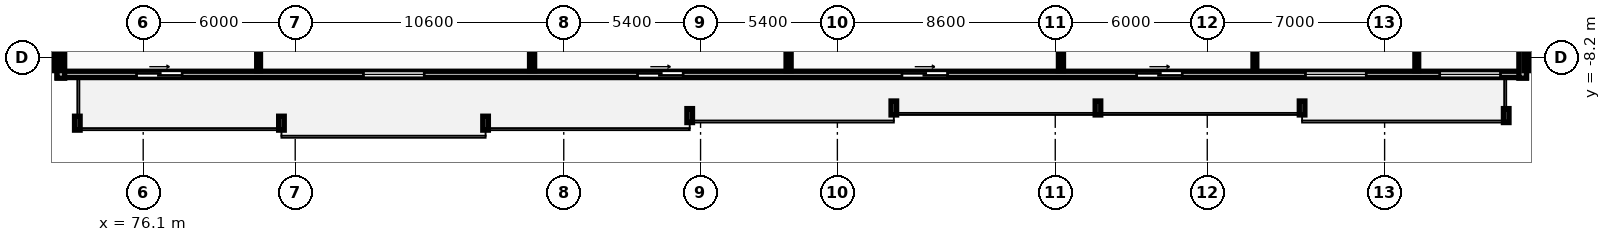
"""IFC4 building model, lengths in metres.
Left out: names, types, materials, properties, quantities, classifications, styles, units other than length and angle.
Written with IfcOpenShell. Run it as: python <this file> out.ifc"""

import sys

from ifc_helpers import new_model, si_unit, direction, frame, frame_2d, origin, place, context, subcontext, project, spatial, rectangle, extrude, element, fill, save


model = new_model("IFC4")
c1 = context("Model", 3, precision=1e-05, world=origin(), true_north=direction((0.0, 1.0)))
c2 = subcontext(c1, "Body", "Model", "MODEL_VIEW")
j1 = project(units=[si_unit("LENGTHUNIT", "METRE"), si_unit("PLANEANGLEUNIT", "RADIAN")], contexts=[c1])
p1 = place(None, origin())
s1 = spatial("IfcSite", under=j1, at=p1, CompositionType="ELEMENT")
p2 = place(p1, origin())
s2 = spatial("IfcBuilding", under=s1, at=p2, CompositionType="ELEMENT")
p3 = place(p2, frame((0.0, 0.0, 100.3)))
s3 = spatial("IfcBuildingStorey", under=s2, at=p3, CompositionType="ELEMENT", Elevation=100.3)
p4 = place(p3, frame((72.7, -8.85, 0.0), z_axis=(0.0, 0.0, 1.0), x_axis=(1.0, 0.0, 0.0)))
e1 = element("IfcWall", 1, at=p4, inside=s3, PredefinedType="STANDARD", context=c2, shape_type="SweptSolid", body=[
    extrude(rectangle(XDim=58.0, YDim=0.25, at=frame_2d((29.0, 0.0))), origin(), (0.0, 0.0, 1.0), 2.97),
])
p5 = place(p4, frame((3.137, 0.0, 0.0)))
e2 = element("IfcOpeningElement", 2, at=p5, cuts=e1, PredefinedType="OPENING", context=c2, shape_type="SweptSolid", body=[
    extrude(rectangle(XDim=1.8, YDim=2.2, at=frame_2d((0.9, 1.1))), frame((0.0, 0.135, 0.0), z_axis=(0.0, -1.0, 0.0), x_axis=(1.0, 0.0, 0.0)), (0.0, 0.0, 1.0), 0.27),
])
p6 = place(p4, frame((12.093, 0.0, 0.85)))
e3 = element("IfcOpeningElement", 3, at=p6, cuts=e1, PredefinedType="OPENING", context=c2, shape_type="SweptSolid", body=[
    extrude(rectangle(XDim=2.4, YDim=1.9, at=frame_2d((1.2, 0.95))), frame((0.0, 0.135, 0.0), z_axis=(0.0, -1.0, 0.0), x_axis=(1.0, 0.0, 0.0)), (0.0, 0.0, 1.0), 0.27),
])
p7 = place(p4, frame((22.913, 0.0, 0.0)))
e4 = element("IfcOpeningElement", 4, at=p7, cuts=e1, PredefinedType="OPENING", context=c2, shape_type="SweptSolid", body=[
    extrude(rectangle(XDim=1.8, YDim=2.2, at=frame_2d((0.9, 1.1))), frame((0.0, 0.135, 0.0), z_axis=(0.0, -1.0, 0.0), x_axis=(1.0, 0.0, 0.0)), (0.0, 0.0, 1.0), 0.27),
])
p8 = place(p4, frame((33.35, 0.0, 0.0)))
e5 = element("IfcOpeningElement", 5, at=p8, cuts=e1, PredefinedType="OPENING", context=c2, shape_type="SweptSolid", body=[
    extrude(rectangle(XDim=1.8, YDim=2.2, at=frame_2d((0.9, 1.1))), frame((0.0, 0.135, 0.0), z_axis=(0.0, -1.0, 0.0), x_axis=(1.0, 0.0, 0.0)), (0.0, 0.0, 1.0), 0.27),
])
p9 = place(p4, frame((49.275, 0.0, 0.85)))
e6 = element("IfcOpeningElement", 6, at=p9, cuts=e1, PredefinedType="OPENING", context=c2, shape_type="SweptSolid", body=[
    extrude(rectangle(XDim=2.4, YDim=1.9, at=frame_2d((1.2, 0.95))), frame((0.0, 0.135, 0.0), z_axis=(0.0, -1.0, 0.0), x_axis=(1.0, 0.0, 0.0)), (0.0, 0.0, 1.0), 0.27),
])
p10 = place(p4, frame((42.613, 0.0, 0.0)))
e7 = element("IfcOpeningElement", 7, at=p10, cuts=e1, PredefinedType="OPENING", context=c2, shape_type="SweptSolid", body=[
    extrude(rectangle(XDim=1.8, YDim=2.2, at=frame_2d((0.9, 1.1))), frame((0.0, 0.135, 0.0), z_axis=(0.0, -1.0, 0.0), x_axis=(1.0, 0.0, 0.0)), (0.0, 0.0, 1.0), 0.27),
])
p11 = place(p4, frame((54.575, 0.0, 0.85)))
e8 = element("IfcOpeningElement", 8, at=p11, cuts=e1, PredefinedType="OPENING", context=c2, shape_type="SweptSolid", body=[
    extrude(rectangle(XDim=2.4, YDim=1.9, at=frame_2d((1.2, 0.95))), frame((0.0, 0.135, 0.0), z_axis=(0.0, -1.0, 0.0), x_axis=(1.0, 0.0, 0.0)), (0.0, 0.0, 1.0), 0.27),
])
for number, where, z_axis, x_axis in (
    (9, (130.55, -9.0, 0.0), (0.0, 0.0, 1.0), (0.0, 1.0, 0.0)),
    (10, (72.85, -5.4, 0.0), (0.0, 0.0, 1.0), (0.0, -1.0, 0.0)),
):
    element("IfcWall", number, at=place(p3, frame(where, z_axis=z_axis, x_axis=x_axis)), inside=s3, PredefinedType="STANDARD", context=c2, shape_type="SweptSolid", body=[
        extrude(rectangle(XDim=3.6, YDim=0.3, at=frame_2d((1.8, 0.0))), origin(), (0.0, 0.0, 1.0), 2.97),
    ])
for number, where, z_axis, x_axis in (
    (11, (72.7, -8.7, 0.0), (0.0, 0.0, 1.0), (0.0, 1.0, 0.0)),
    (12, (130.7, -8.7, 0.0), (0.0, 0.0, 1.0), (0.0, 1.0, 0.0)),
    (13, (91.45, -8.7, 0.0), (0.0, 0.0, 1.0), (0.0, 1.0, 0.0)),
):
    element("IfcWall", number, at=place(p3, frame(where, z_axis=z_axis, x_axis=x_axis)), inside=s3, PredefinedType="PARTITIONING", context=c2, shape_type="SweptSolid", body=[
        extrude(rectangle(XDim=24.57, YDim=0.2, at=frame_2d((12.285, 0.0))), origin(), (0.0, 0.0, 1.0), 2.97),
    ])
p12 = place(p3, frame((80.655, -8.7, 0.0), z_axis=(0.0, 0.0, 1.0), x_axis=(0.0, 1.0, 0.0)))
e14 = element("IfcWall", 14, at=p12, inside=s3, PredefinedType="PARTITIONING", context=c2, shape_type="SweptSolid", body=[
    extrude(rectangle(XDim=4.47, YDim=0.15, at=frame_2d((2.235, 0.0))), origin(), (0.0, 0.0, 1.0), 2.97),
])
for number, where, z_axis, x_axis in (
    (15, (101.575, -8.7, 0.0), (0.0, 0.0, 1.0), (0.0, 1.0, 0.0)),
    (16, (112.325, -8.7, 0.0), (0.0, 0.0, 1.0), (0.0, 1.0, 0.0)),
):
    element("IfcWall", number, at=place(p3, frame(where, z_axis=z_axis, x_axis=x_axis)), inside=s3, PredefinedType="PARTITIONING", context=c2, shape_type="SweptSolid", body=[
        extrude(rectangle(XDim=24.57, YDim=0.2, at=frame_2d((12.285, 0.0))), origin(), (0.0, 0.0, 1.0), 2.97),
    ])
p13 = place(p3, frame((119.98, -8.7, 0.0), z_axis=(0.0, 0.0, 1.0), x_axis=(0.0, 1.0, 0.0)))
e17 = element("IfcWall", 17, at=p13, inside=s3, PredefinedType="PARTITIONING", context=c2, shape_type="SweptSolid", body=[
    extrude(rectangle(XDim=9.61, YDim=0.15, at=frame_2d((4.805, 0.0))), origin(), (0.0, 0.0, 1.0), 2.97),
])
p14 = place(p13, frame((5.81, 0.0, 0.0)))
e18 = element("IfcOpeningElement", 18, at=p14, cuts=e17, PredefinedType="OPENING", context=c2, shape_type="SweptSolid", body=[
    extrude(rectangle(XDim=0.92, YDim=2.08, at=frame_2d((0.46, 1.04))), frame((0.0, 0.085, 0.0), z_axis=(0.0, -1.0, 0.0), x_axis=(1.0, 0.0, 0.0)), (0.0, 0.0, 1.0), 0.17),
])
p15 = place(p3, frame((126.37, -8.7, 0.0), z_axis=(0.0, 0.0, 1.0), x_axis=(0.0, 1.0, 0.0)))
e19 = element("IfcWall", 19, at=p15, inside=s3, PredefinedType="PARTITIONING", context=c2, shape_type="SweptSolid", body=[
    extrude(rectangle(XDim=6.99, YDim=0.15, at=frame_2d((3.495, 0.0))), origin(), (0.0, 0.0, 1.0), 2.97),
])
p16 = place(p15, frame((5.81, 0.0, 0.0)))
e20 = element("IfcOpeningElement", 20, at=p16, cuts=e19, PredefinedType="OPENING", context=c2, shape_type="SweptSolid", body=[
    extrude(rectangle(XDim=0.92, YDim=2.08, at=frame_2d((0.46, 1.04))), frame((0.0, 0.085, 0.0), z_axis=(0.0, -1.0, 0.0), x_axis=(1.0, 0.0, 0.0)), (0.0, 0.0, 1.0), 0.17),
])
p17 = place(p5, origin())
e21 = element("IfcDoor", 21, at=p17, inside=s3, OperationType="SLIDING_TO_RIGHT", PredefinedType="DOOR", context=c2, shape_type="SweptSolid", body=[
    extrude(rectangle(XDim=1.8, YDim=2.2, at=frame_2d((0.9, 1.1))), frame((0.0, 0.025, 0.0), z_axis=(0.0, -1.0, 0.0), x_axis=(1.0, 0.0, 0.0)), (0.0, 0.0, 1.0), 0.05),
])
fill(e2, e21)
p18 = place(p6, origin())
e22 = element("IfcWindow", 22, at=p18, inside=s3, PartitioningType="DOUBLE_PANEL_VERTICAL", PredefinedType="WINDOW", context=c2, shape_type="SweptSolid", body=[
    extrude(rectangle(XDim=2.4, YDim=1.9, at=frame_2d((1.2, 0.95))), frame((0.0, 0.03, 0.0), z_axis=(0.0, -1.0, 0.0), x_axis=(1.0, 0.0, 0.0)), (0.0, 0.0, 1.0), 0.06),
])
fill(e3, e22)
p19 = place(p7, origin())
e23 = element("IfcDoor", 23, at=p19, inside=s3, OperationType="SLIDING_TO_RIGHT", PredefinedType="DOOR", context=c2, shape_type="SweptSolid", body=[
    extrude(rectangle(XDim=1.8, YDim=2.2, at=frame_2d((0.9, 1.1))), frame((0.0, 0.025, 0.0), z_axis=(0.0, -1.0, 0.0), x_axis=(1.0, 0.0, 0.0)), (0.0, 0.0, 1.0), 0.05),
])
fill(e4, e23)
p20 = place(p8, origin())
e24 = element("IfcDoor", 24, at=p20, inside=s3, OperationType="SLIDING_TO_RIGHT", PredefinedType="DOOR", context=c2, shape_type="SweptSolid", body=[
    extrude(rectangle(XDim=1.8, YDim=2.2, at=frame_2d((0.9, 1.1))), frame((0.0, 0.025, 0.0), z_axis=(0.0, -1.0, 0.0), x_axis=(1.0, 0.0, 0.0)), (0.0, 0.0, 1.0), 0.05),
])
fill(e5, e24)
p21 = place(p9, origin())
e25 = element("IfcWindow", 25, at=p21, inside=s3, PartitioningType="DOUBLE_PANEL_VERTICAL", PredefinedType="WINDOW", context=c2, shape_type="SweptSolid", body=[
    extrude(rectangle(XDim=2.4, YDim=1.9, at=frame_2d((1.2, 0.95))), frame((0.0, 0.03, 0.0), z_axis=(0.0, -1.0, 0.0), x_axis=(1.0, 0.0, 0.0)), (0.0, 0.0, 1.0), 0.06),
])
fill(e6, e25)
p22 = place(p10, origin())
e26 = element("IfcDoor", 26, at=p22, inside=s3, OperationType="SLIDING_TO_RIGHT", PredefinedType="DOOR", context=c2, shape_type="SweptSolid", body=[
    extrude(rectangle(XDim=1.8, YDim=2.2, at=frame_2d((0.9, 1.1))), frame((0.0, 0.025, 0.0), z_axis=(0.0, -1.0, 0.0), x_axis=(1.0, 0.0, 0.0)), (0.0, 0.0, 1.0), 0.05),
])
fill(e7, e26)
p23 = place(p11, origin())
e27 = element("IfcWindow", 27, at=p23, inside=s3, PartitioningType="DOUBLE_PANEL_VERTICAL", PredefinedType="WINDOW", context=c2, shape_type="SweptSolid", body=[
    extrude(rectangle(XDim=2.4, YDim=1.9, at=frame_2d((1.2, 0.95))), frame((0.0, 0.03, 0.0), z_axis=(0.0, -1.0, 0.0), x_axis=(1.0, 0.0, 0.0)), (0.0, 0.0, 1.0), 0.06),
])
fill(e8, e27)
save(model, sys.argv[1])
